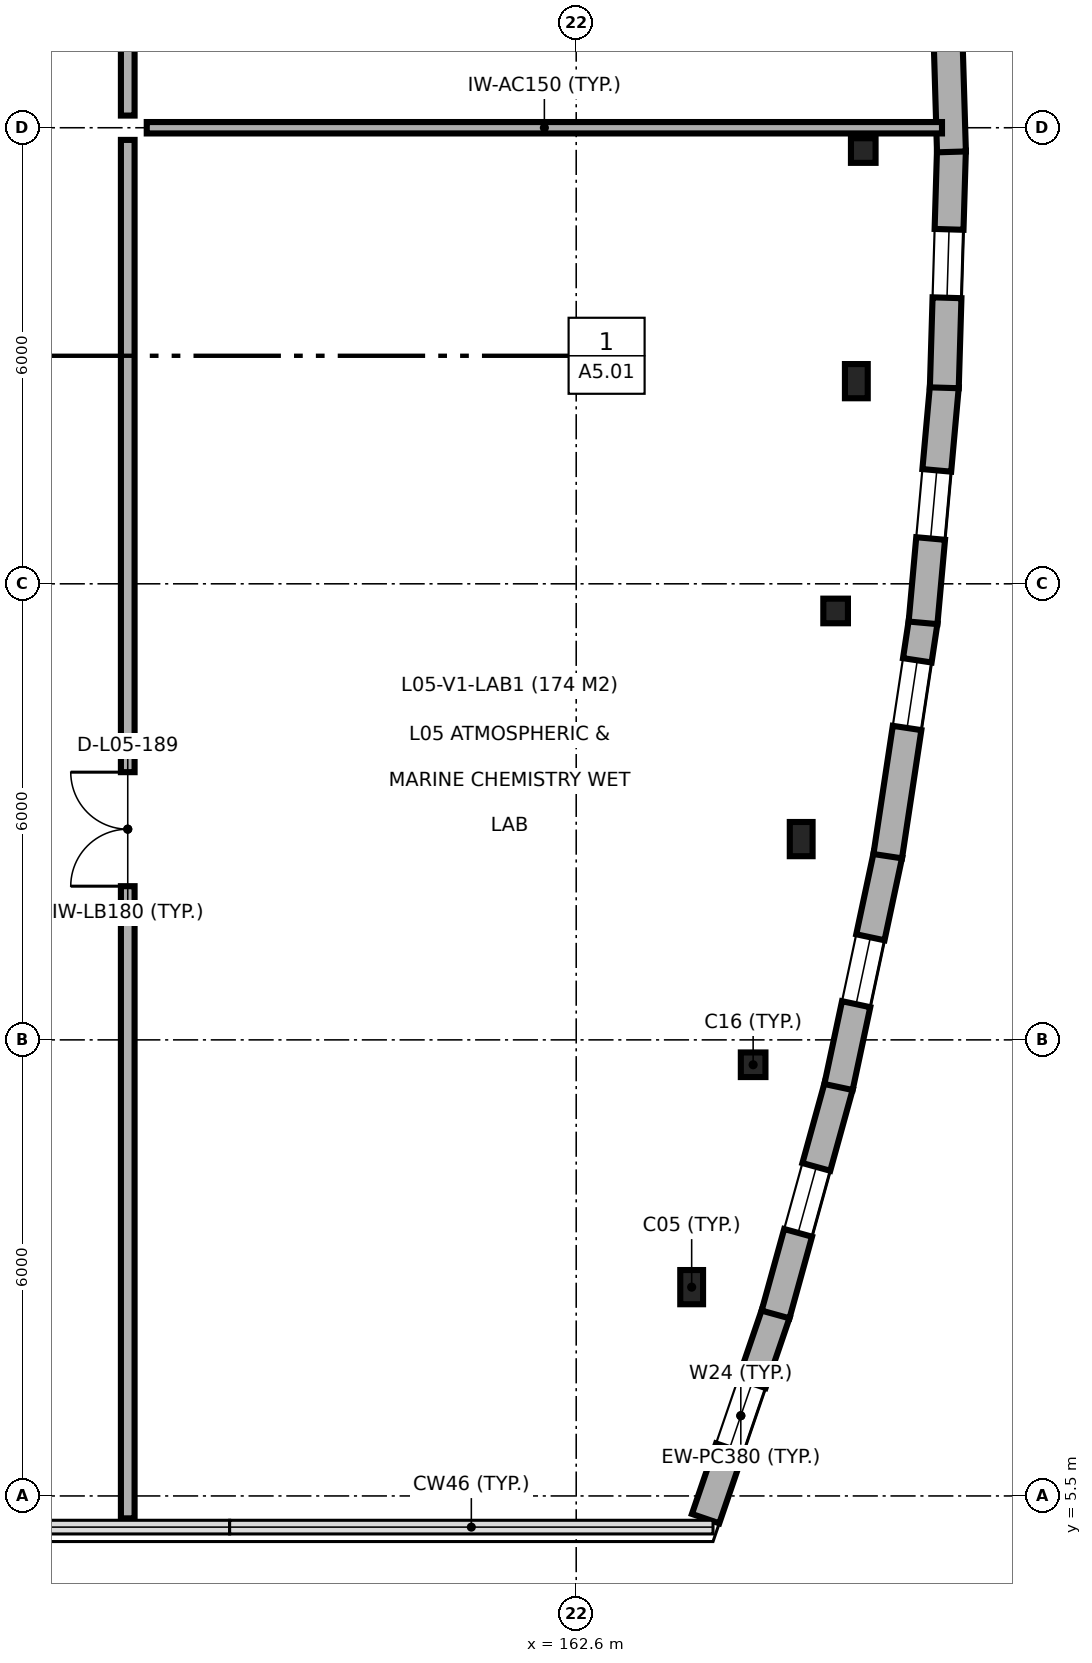
"""IFC4 building model, lengths in metres.
Left out: names, types, materials, properties, quantities, classifications, styles, units other than length and angle.
Written with IfcOpenShell. Run it as: python <this file> out.ifc"""

import sys

from ifc_helpers import new_model, si_unit, direction, frame, frame_2d, origin, origin_2d, place, context, subcontext, project, spatial, rectangle, hollow_circle, i_section, extrude, element, fill, save


model = new_model("IFC4")
c1 = context("Model", 3, precision=1e-05, world=origin(), true_north=direction((0.0, 1.0)))
c2 = subcontext(c1, "Body", "Model", "MODEL_VIEW")
j1 = project(units=[si_unit("LENGTHUNIT", "METRE"), si_unit("PLANEANGLEUNIT", "RADIAN")], contexts=[c1])
p1 = place(None, origin())
s1 = spatial("IfcSite", under=j1, at=p1, CompositionType="ELEMENT")
p2 = place(p1, origin())
s2 = spatial("IfcBuilding", under=s1, at=p2, CompositionType="ELEMENT")
p3 = place(p2, frame((0.0, 0.0, 22.8)))
s3 = spatial("IfcBuildingStorey", under=s2, at=p3, CompositionType="ELEMENT", Elevation=22.8)
p4 = place(p3, frame((164.119, 8.247, 0.0), z_axis=(0.0, 0.0, 1.0), x_axis=(1.0, 0.0, 0.0)))
e1 = element("IfcColumn", 1, at=p4, inside=s3, PredefinedType="COLUMN", context=c2, shape_type="SweptSolid", body=[
    extrude(i_section(OverallWidth=0.3, OverallDepth=0.45, WebThickness=0.014, FlangeThickness=0.026, FilletRadius=0.027, at=origin_2d()), origin(), (0.0, 0.0, 1.0), 3.9),
])
p5 = place(p3, frame((164.928, 11.173, 0.0), z_axis=(0.0, 0.0, 1.0), x_axis=(1.0, 0.0, 0.0)))
e2 = element("IfcColumn", 2, at=p5, inside=s3, PredefinedType="COLUMN", context=c2, shape_type="SweptSolid", body=[
    extrude(hollow_circle(Radius=0.162, WallThickness=0.016, at=origin_2d()), origin(), (0.0, 0.0, 1.0), 3.9),
])
p6 = place(p3, frame((165.56, 14.142, 0.0), z_axis=(0.0, 0.0, 1.0), x_axis=(1.0, 0.0, 0.0)))
e3 = element("IfcColumn", 3, at=p6, inside=s3, PredefinedType="COLUMN", context=c2, shape_type="SweptSolid", body=[
    extrude(i_section(OverallWidth=0.3, OverallDepth=0.45, WebThickness=0.014, FlangeThickness=0.026, FilletRadius=0.027, at=origin_2d()), origin(), (0.0, 0.0, 1.0), 3.9),
])
p7 = place(p3, frame((166.013, 17.143, 0.0), z_axis=(0.0, 0.0, 1.0), x_axis=(1.0, 0.0, 0.0)))
e4 = element("IfcColumn", 4, at=p7, inside=s3, PredefinedType="COLUMN", context=c2, shape_type="SweptSolid", body=[
    extrude(hollow_circle(Radius=0.162, WallThickness=0.016, at=origin_2d()), origin(), (0.0, 0.0, 1.0), 3.9),
])
p8 = place(p3, frame((166.285, 20.166, 0.0), z_axis=(0.0, 0.0, 1.0), x_axis=(1.0, 0.0, 0.0)))
e5 = element("IfcColumn", 5, at=p8, inside=s3, PredefinedType="COLUMN", context=c2, shape_type="SweptSolid", body=[
    extrude(i_section(OverallWidth=0.3, OverallDepth=0.45, WebThickness=0.014, FlangeThickness=0.026, FilletRadius=0.027, at=origin_2d()), origin(), (0.0, 0.0, 1.0), 3.9),
])
p9 = place(p3, frame((166.376, 23.2, 0.0), z_axis=(0.0, 0.0, 1.0), x_axis=(1.0, 0.0, 0.0)))
e6 = element("IfcColumn", 6, at=p9, inside=s3, PredefinedType="COLUMN", context=c2, shape_type="SweptSolid", body=[
    extrude(hollow_circle(Radius=0.162, WallThickness=0.016, at=origin_2d()), origin(), (0.0, 0.0, 1.0), 3.9),
])
p10 = place(p3, frame((164.302, 5.201, 0.0), z_axis=(0.0, 0.0, 1.0), x_axis=(0.323739917301, 0.946146112366, 0.0)))
e7 = element("IfcWall", 7, at=p10, inside=s3, PredefinedType="SOLIDWALL", context=c2, shape_type="SweptSolid", body=[
    extrude(rectangle(XDim=2.863, YDim=0.38, at=frame_2d((1.431, 0.0))), origin(), (0.0, 0.0, 1.0), 3.68),
])
p11 = place(p10, frame((0.981, 0.0, 0.9)))
e8 = element("IfcOpeningElement", 8, at=p11, cuts=e7, PredefinedType="OPENING", context=c2, shape_type="SweptSolid", body=[
    extrude(rectangle(XDim=0.9, YDim=1.8, at=frame_2d((0.45, 0.9))), frame((0.0, 0.2, 0.0), z_axis=(0.0, -1.0, 0.0), x_axis=(1.0, 0.0, 0.0)), (0.0, 0.0, 1.0), 0.4),
])
p12 = place(p3, frame((165.222, 7.888, 0.0), z_axis=(0.0, 0.0, 1.0), x_axis=(0.266536691105, 0.963824772609, 0.0)))
e9 = element("IfcWall", 9, at=p12, inside=s3, PredefinedType="SOLIDWALL", context=c2, shape_type="SweptSolid", body=[
    extrude(rectangle(XDim=3.128, YDim=0.38, at=frame_2d((1.564, 0.0))), origin(), (0.0, 0.0, 1.0), 3.68),
])
p13 = place(p12, frame((1.114, 0.0, 0.9)))
e10 = element("IfcOpeningElement", 10, at=p13, cuts=e9, PredefinedType="OPENING", context=c2, shape_type="SweptSolid", body=[
    extrude(rectangle(XDim=0.9, YDim=1.8, at=frame_2d((0.45, 0.9))), frame((0.0, 0.2, 0.0), z_axis=(0.0, -1.0, 0.0), x_axis=(1.0, 0.0, 0.0)), (0.0, 0.0, 1.0), 0.4),
])
p14 = place(p3, frame((166.051, 10.88, 0.0), z_axis=(0.0, 0.0, 1.0), x_axis=(0.208287141705, 0.978067720866, 0.0)))
e11 = element("IfcWall", 11, at=p14, inside=s3, PredefinedType="SOLIDWALL", context=c2, shape_type="SweptSolid", body=[
    extrude(rectangle(XDim=3.128, YDim=0.38, at=frame_2d((1.564, 0.0))), origin(), (0.0, 0.0, 1.0), 3.68),
])
p15 = place(p14, frame((1.114, 0.0, 0.9)))
e12 = element("IfcOpeningElement", 12, at=p15, cuts=e11, PredefinedType="OPENING", context=c2, shape_type="SweptSolid", body=[
    extrude(rectangle(XDim=0.9, YDim=1.8, at=frame_2d((0.45, 0.9))), frame((0.0, 0.2, 0.0), z_axis=(0.0, -1.0, 0.0), x_axis=(1.0, 0.0, 0.0)), (0.0, 0.0, 1.0), 0.4),
])
p16 = place(p3, frame((166.698, 13.917, 0.0), z_axis=(0.0, 0.0, 1.0), x_axis=(0.149218139282, 0.988804301624, 0.0)))
e13 = element("IfcWall", 13, at=p16, inside=s3, PredefinedType="SOLIDWALL", context=c2, shape_type="SweptSolid", body=[
    extrude(rectangle(XDim=3.128, YDim=0.38, at=frame_2d((1.564, 0.0))), origin(), (0.0, 0.0, 1.0), 3.68),
])
p17 = place(p16, frame((1.706, 0.0, 0.9)))
e14 = element("IfcOpeningElement", 14, at=p17, cuts=e13, PredefinedType="OPENING", context=c2, shape_type="SweptSolid", body=[
    extrude(rectangle(XDim=0.9, YDim=1.8, at=frame_2d((0.45, 0.9))), frame((0.0, 0.2, 0.0), z_axis=(0.0, -1.0, 0.0), x_axis=(1.0, 0.0, 0.0)), (0.0, 0.0, 1.0), 0.4),
])
p18 = place(p3, frame((167.163, 16.987, 0.0), z_axis=(0.0, 0.0, 1.0), x_axis=(0.089747627339, 0.995964539222, 0.0)))
e15 = element("IfcWall", 15, at=p18, inside=s3, PredefinedType="SOLIDWALL", context=c2, shape_type="SweptSolid", body=[
    extrude(rectangle(XDim=3.128, YDim=0.38, at=frame_2d((1.564, 0.0))), origin(), (0.0, 0.0, 1.0), 3.68),
])
p19 = place(p18, frame((1.114, 0.0, 0.9)))
e16 = element("IfcOpeningElement", 16, at=p19, cuts=e15, PredefinedType="OPENING", context=c2, shape_type="SweptSolid", body=[
    extrude(rectangle(XDim=0.9, YDim=1.8, at=frame_2d((0.45, 0.9))), frame((0.0, 0.2, 0.0), z_axis=(0.0, -1.0, 0.0), x_axis=(1.0, 0.0, 0.0)), (0.0, 0.0, 1.0), 0.4),
])
p20 = place(p3, frame((167.443, 20.079, 0.0), z_axis=(0.0, 0.0, 1.0), x_axis=(0.02996779607, 0.999550864738, 0.0)))
e17 = element("IfcWall", 17, at=p20, inside=s3, PredefinedType="SOLIDWALL", context=c2, shape_type="SweptSolid", body=[
    extrude(rectangle(XDim=3.128, YDim=0.38, at=frame_2d((1.564, 0.0))), origin(), (0.0, 0.0, 1.0), 3.68),
])
p21 = place(p20, frame((1.185, 0.0, 0.9)))
e18 = element("IfcOpeningElement", 18, at=p21, cuts=e17, PredefinedType="OPENING", context=c2, shape_type="SweptSolid", body=[
    extrude(rectangle(XDim=0.9, YDim=1.8, at=frame_2d((0.45, 0.9))), frame((0.0, 0.2, 0.0), z_axis=(0.0, -1.0, 0.0), x_axis=(1.0, 0.0, 0.0)), (0.0, 0.0, 1.0), 0.4),
])
p22 = place(p3, frame((167.537, 23.182, 0.0), z_axis=(0.0, 0.0, 1.0), x_axis=(-0.029970133922, 0.999550794644, 0.0)))
e19 = element("IfcWall", 19, at=p22, inside=s3, PredefinedType="SOLIDWALL", context=c2, shape_type="SweptSolid", body=[
    extrude(rectangle(XDim=3.128, YDim=0.38, at=frame_2d((1.564, 0.0))), origin(), (0.0, 0.0, 1.0), 3.68),
])
p23 = place(p22, frame((1.638, 0.0, 0.9)))
e20 = element("IfcOpeningElement", 20, at=p23, cuts=e19, PredefinedType="OPENING", context=c2, shape_type="SweptSolid", body=[
    extrude(rectangle(XDim=0.9, YDim=1.8, at=frame_2d((0.45, 0.9))), frame((0.0, 0.2, 0.0), z_axis=(0.0, -1.0, 0.0), x_axis=(1.0, 0.0, 0.0)), (0.0, 0.0, 1.0), 0.4),
])
p24 = place(p3, frame((156.95, 23.5, 0.0), z_axis=(0.0, 0.0, 1.0), x_axis=(1.0, 0.0, 0.0)))
e21 = element("IfcWall", 21, at=p24, inside=s3, PredefinedType="PARTITIONING", context=c2, shape_type="SweptSolid", body=[
    extrude(rectangle(XDim=10.462, YDim=0.15, at=frame_2d((5.231, 0.0))), origin(), (0.0, 0.0, 1.0), 3.18),
])
p25 = place(p3, frame((156.7, 5.205, 0.0), z_axis=(0.0, 0.0, 1.0), x_axis=(0.0, 1.0, 0.0)))
e22 = element("IfcWall", 22, at=p25, inside=s3, PredefinedType="PARTITIONING", context=c2, shape_type="SweptSolid", body=[
    extrude(rectangle(XDim=18.135, YDim=0.18, at=frame_2d((9.067, 0.0))), origin(), (0.0, 0.0, 1.0), 3.68),
])
p26 = place(p25, frame((8.317, 0.0, 0.0)))
e23 = element("IfcOpeningElement", 23, at=p26, cuts=e22, PredefinedType="OPENING", context=c2, shape_type="SweptSolid", body=[
    extrude(rectangle(XDim=1.5, YDim=2.2, at=frame_2d((0.75, 1.1))), frame((0.0, 0.1, 0.0), z_axis=(0.0, -1.0, 0.0), x_axis=(1.0, 0.0, 0.0)), (0.0, 0.0, 1.0), 0.2),
])
p27 = place(p3, frame((156.7, 23.66, 0.0), z_axis=(0.0, 0.0, 1.0), x_axis=(0.0, 1.0, 0.0)))
e24 = element("IfcWall", 24, at=p27, inside=s3, PredefinedType="PARTITIONING", context=c2, shape_type="SweptSolid", body=[
    extrude(rectangle(XDim=10.18, YDim=0.18, at=frame_2d((5.09, 0.0))), origin(), (0.0, 0.0, 1.0), 3.68),
])
p28 = place(p27, frame((4.54, 0.0, 0.0)))
e25 = element("IfcOpeningElement", 25, at=p28, cuts=e24, PredefinedType="OPENING", context=c2, shape_type="SweptSolid", body=[
    extrude(rectangle(XDim=1.1, YDim=2.15, at=frame_2d((0.55, 1.075))), frame((0.0, 0.1, 0.0), z_axis=(0.0, -1.0, 0.0), x_axis=(1.0, 0.0, 0.0)), (0.0, 0.0, 1.0), 0.2),
])
p29 = place(p11, origin())
e26 = element("IfcWindow", 26, at=p29, inside=s3, PartitioningType="SINGLE_PANEL", PredefinedType="WINDOW", context=c2, shape_type="SweptSolid", body=[
    extrude(rectangle(XDim=0.9, YDim=1.8, at=frame_2d((0.45, 0.9))), frame((0.0, 0.03, 0.0), z_axis=(0.0, -1.0, 0.0), x_axis=(1.0, 0.0, 0.0)), (0.0, 0.0, 1.0), 0.06),
])
fill(e8, e26)
p30 = place(p13, origin())
e27 = element("IfcWindow", 27, at=p30, inside=s3, PartitioningType="SINGLE_PANEL", PredefinedType="WINDOW", context=c2, shape_type="SweptSolid", body=[
    extrude(rectangle(XDim=0.9, YDim=1.8, at=frame_2d((0.45, 0.9))), frame((0.0, 0.03, 0.0), z_axis=(0.0, -1.0, 0.0), x_axis=(1.0, 0.0, 0.0)), (0.0, 0.0, 1.0), 0.06),
])
fill(e10, e27)
p31 = place(p15, origin())
e28 = element("IfcWindow", 28, at=p31, inside=s3, PartitioningType="SINGLE_PANEL", PredefinedType="WINDOW", context=c2, shape_type="SweptSolid", body=[
    extrude(rectangle(XDim=0.9, YDim=1.8, at=frame_2d((0.45, 0.9))), frame((0.0, 0.03, 0.0), z_axis=(0.0, -1.0, 0.0), x_axis=(1.0, 0.0, 0.0)), (0.0, 0.0, 1.0), 0.06),
])
fill(e12, e28)
p32 = place(p17, origin())
e29 = element("IfcWindow", 29, at=p32, inside=s3, PartitioningType="SINGLE_PANEL", PredefinedType="WINDOW", context=c2, shape_type="SweptSolid", body=[
    extrude(rectangle(XDim=0.9, YDim=1.8, at=frame_2d((0.45, 0.9))), frame((0.0, 0.03, 0.0), z_axis=(0.0, -1.0, 0.0), x_axis=(1.0, 0.0, 0.0)), (0.0, 0.0, 1.0), 0.06),
])
fill(e14, e29)
p33 = place(p19, origin())
e30 = element("IfcWindow", 30, at=p33, inside=s3, PartitioningType="SINGLE_PANEL", PredefinedType="WINDOW", context=c2, shape_type="SweptSolid", body=[
    extrude(rectangle(XDim=0.9, YDim=1.8, at=frame_2d((0.45, 0.9))), frame((0.0, 0.03, 0.0), z_axis=(0.0, -1.0, 0.0), x_axis=(1.0, 0.0, 0.0)), (0.0, 0.0, 1.0), 0.06),
])
fill(e16, e30)
p34 = place(p21, origin())
e31 = element("IfcWindow", 31, at=p34, inside=s3, PartitioningType="SINGLE_PANEL", PredefinedType="WINDOW", context=c2, shape_type="SweptSolid", body=[
    extrude(rectangle(XDim=0.9, YDim=1.8, at=frame_2d((0.45, 0.9))), frame((0.0, 0.03, 0.0), z_axis=(0.0, -1.0, 0.0), x_axis=(1.0, 0.0, 0.0)), (0.0, 0.0, 1.0), 0.06),
])
fill(e18, e31)
p35 = place(p26, origin())
e32 = element("IfcDoor", 32, at=p35, inside=s3, OperationType="DOUBLE_DOOR_SINGLE_SWING", PredefinedType="DOOR", context=c2, shape_type="SweptSolid", body=[
    extrude(rectangle(XDim=1.5, YDim=2.2, at=frame_2d((0.75, 1.1))), frame((0.0, 0.025, 0.0), z_axis=(0.0, -1.0, 0.0), x_axis=(1.0, 0.0, 0.0)), (0.0, 0.0, 1.0), 0.05),
])
fill(e23, e32)
save(model, sys.argv[1])
